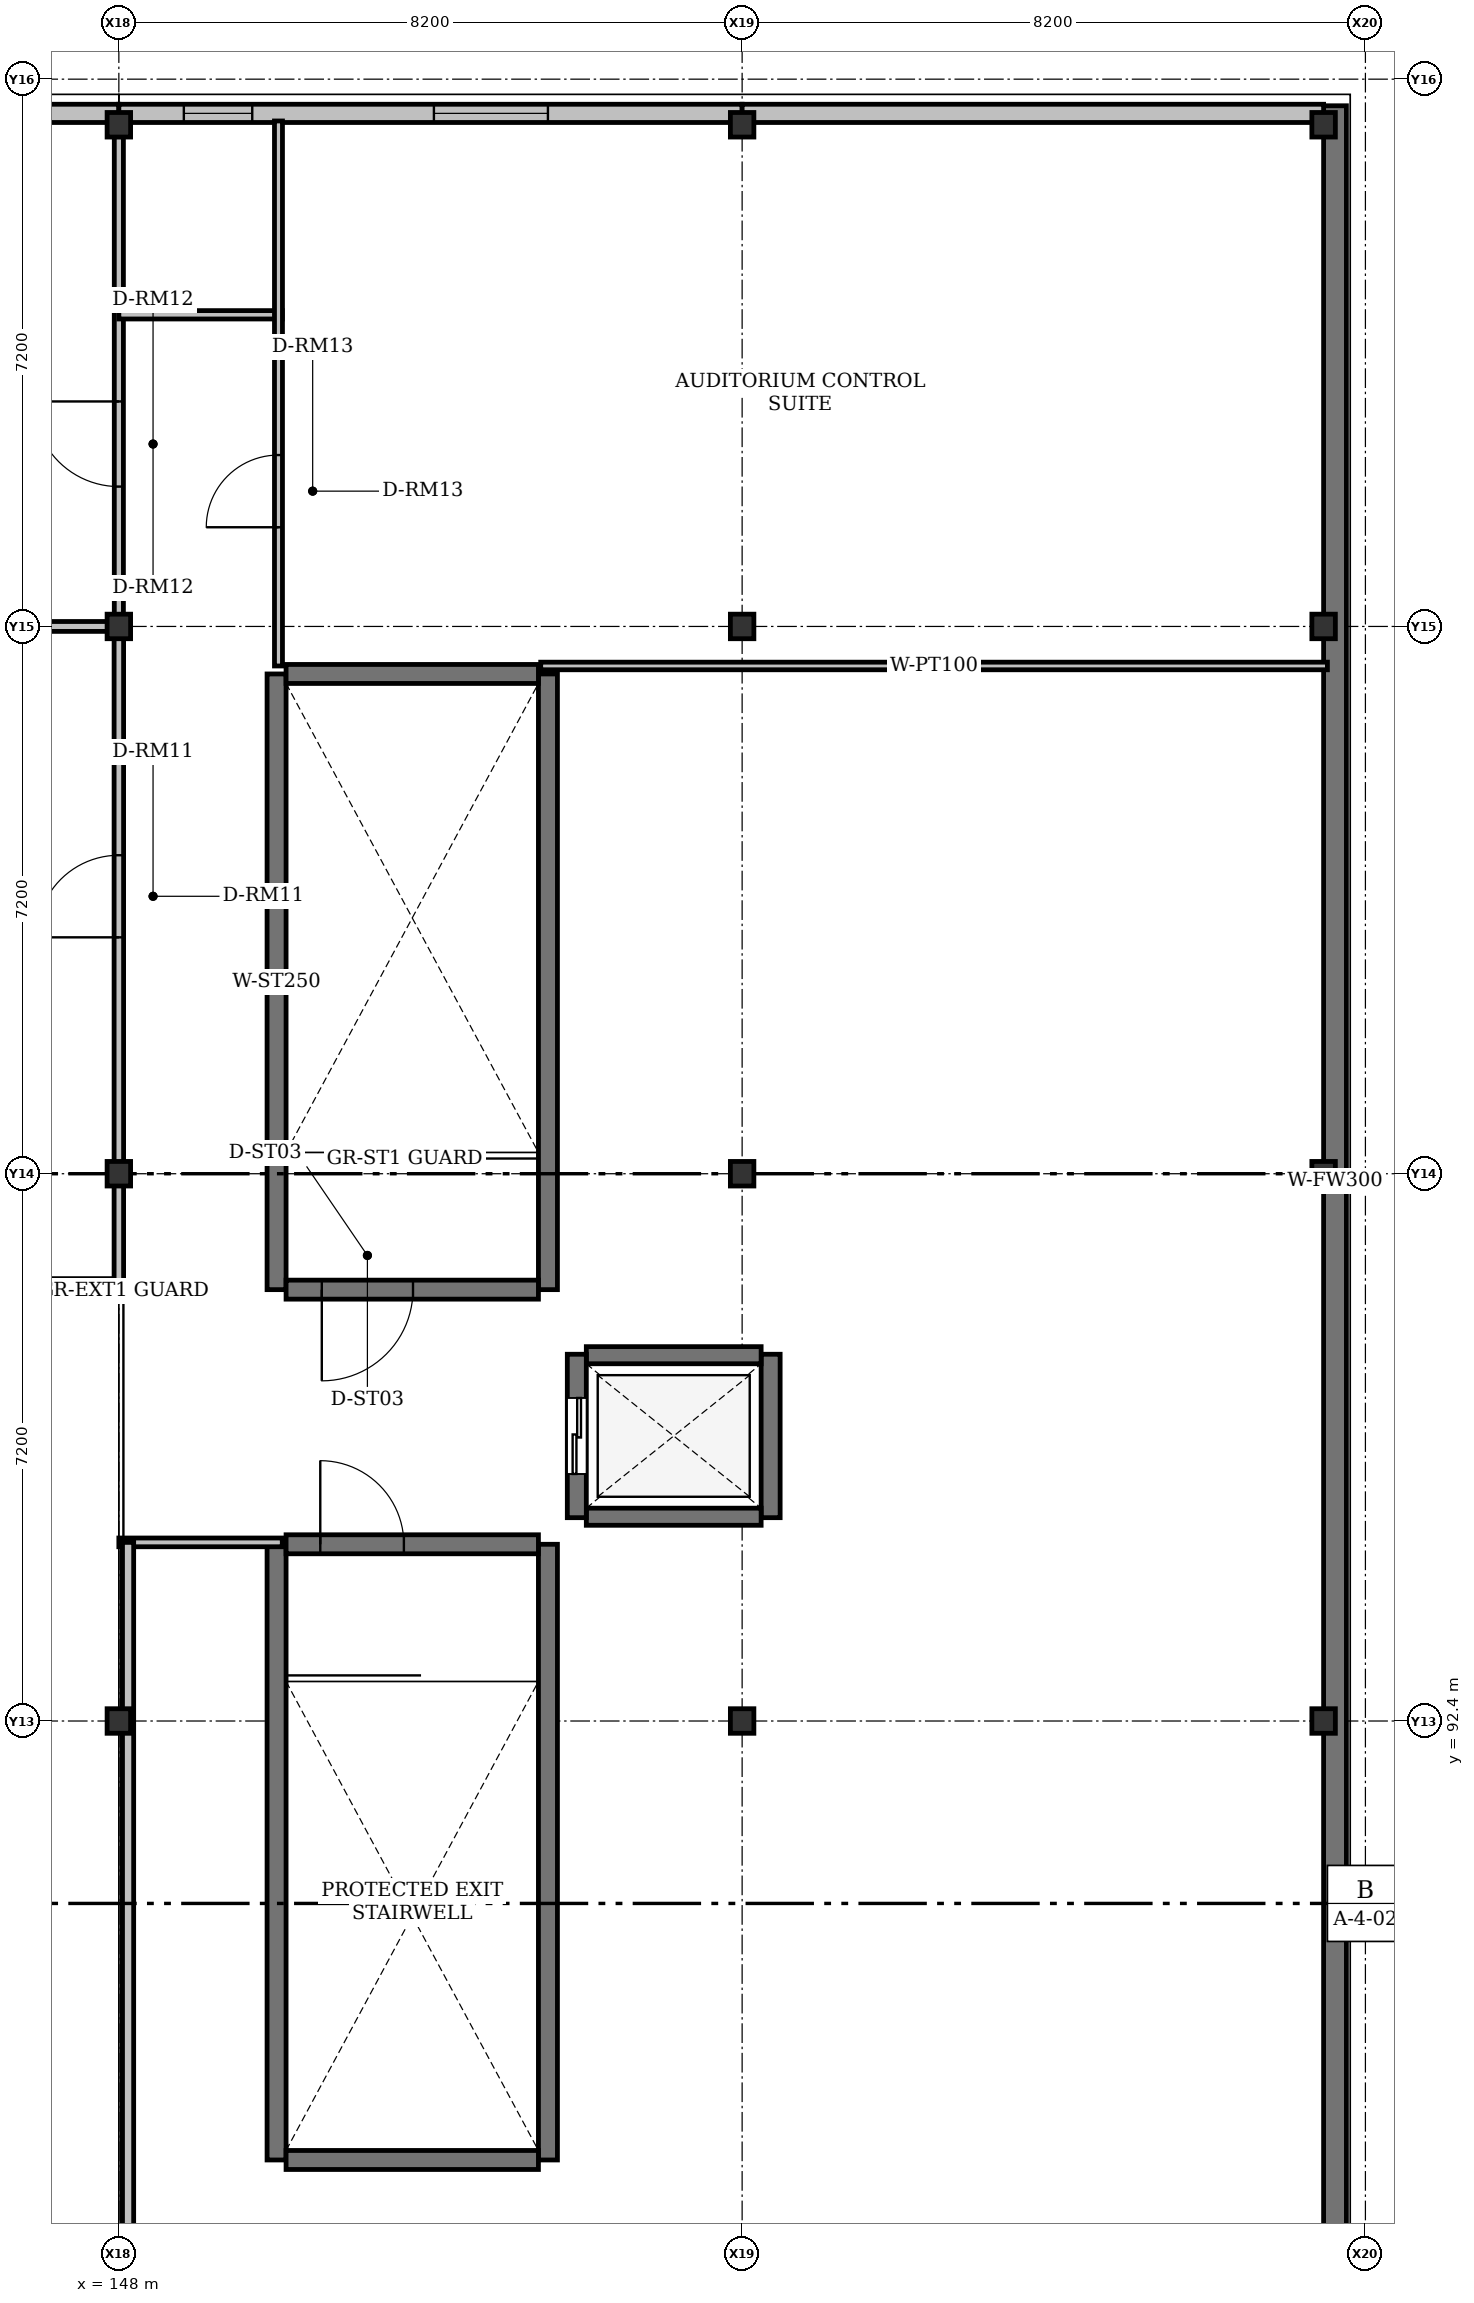
"""IFC4 building model, lengths in metres.
Left out: names, types, materials, properties, quantities, classifications, styles, units other than length and angle.
Written with IfcOpenShell. Run it as: python <this file> out.ifc"""

import sys

from ifc_helpers import new_model, si_unit, direction, frame, frame_2d, origin, origin_2d, place, context, subcontext, project, spatial, rectangle, i_section, extrude, element, fill, save


model = new_model("IFC4")
c1 = context("Model", 3, precision=1e-05, world=origin(), true_north=direction((0.0, 1.0)))
c2 = subcontext(c1, "Body", "Model", "MODEL_VIEW")
j1 = project(units=[si_unit("LENGTHUNIT", "METRE"), si_unit("PLANEANGLEUNIT", "RADIAN")], contexts=[c1])
p1 = place(None, origin())
s1 = spatial("IfcSite", under=j1, at=p1, CompositionType="ELEMENT")
p2 = place(p1, origin())
s2 = spatial("IfcBuilding", under=s1, at=p2, CompositionType="ELEMENT")
p3 = place(p2, frame((0.0, 0.0, 9.9)))
s3 = spatial("IfcBuildingStorey", under=s2, at=p3, CompositionType="ELEMENT", Elevation=9.9)
for number, where, z_axis, x_axis in (
    (1, (148.0, 92.4, 0.0), (0.0, 0.0, 1.0), (1.0, 0.0, 0.0)),
    (2, (148.0, 99.6, 0.0), (0.0, 0.0, 1.0), (1.0, 0.0, 0.0)),
    (3, (148.0, 106.8, 0.0), (0.0, 0.0, 1.0), (1.0, 0.0, 0.0)),
    (4, (148.0, 113.4, 0.0), (0.0, 0.0, 1.0), (1.0, 0.0, 0.0)),
    (5, (156.2, 92.4, 0.0), (0.0, 0.0, 1.0), (1.0, 0.0, 0.0)),
    (6, (156.2, 99.6, 0.0), (0.0, 0.0, 1.0), (1.0, 0.0, 0.0)),
    (7, (156.2, 106.8, 0.0), (0.0, 0.0, 1.0), (1.0, 0.0, 0.0)),
    (8, (156.2, 113.4, 0.0), (0.0, 0.0, 1.0), (1.0, 0.0, 0.0)),
    (9, (163.85, 92.4, 0.0), (0.0, 0.0, 1.0), (1.0, 0.0, 0.0)),
    (10, (163.85, 99.6, 0.0), (0.0, 0.0, 1.0), (1.0, 0.0, 0.0)),
    (11, (163.85, 106.8, 0.0), (0.0, 0.0, 1.0), (1.0, 0.0, 0.0)),
    (12, (163.85, 113.4, 0.0), (0.0, 0.0, 1.0), (1.0, 0.0, 0.0)),
):
    element("IfcColumn", number, at=place(p3, frame(where, z_axis=z_axis, x_axis=x_axis)), inside=s3, PredefinedType="COLUMN", context=c2, shape_type="SweptSolid", body=[
        extrude(i_section(OverallWidth=0.309, OverallDepth=0.323, WebThickness=0.014, FlangeThickness=0.023, FilletRadius=0.015, at=origin_2d()), origin(), (0.0, 0.0, 1.0), 2.9),
    ])
p4 = place(p3, frame((164.0, 113.65, 0.0), z_axis=(0.0, 0.0, 1.0), x_axis=(0.0, -1.0, 0.0)))
e13 = element("IfcWall", 13, at=p4, inside=s3, PredefinedType="SOLIDWALL", context=c2, shape_type="SweptSolid", body=[
    extrude(rectangle(XDim=28.3, YDim=0.3, at=frame_2d((14.15, 0.0))), origin(), (0.0, 0.0, 1.0), 2.7),
])
p5 = place(p3, frame((139.8, 113.55, 0.0), z_axis=(0.0, 0.0, 1.0), x_axis=(1.0, 0.0, 0.0)))
e14 = element("IfcWall", 14, at=p5, inside=s3, PredefinedType="SOLIDWALL", context=c2, shape_type="SweptSolid", body=[
    extrude(rectangle(XDim=8.2, YDim=0.24, at=frame_2d((4.1, 0.0))), origin(), (0.0, 0.0, 1.0), 2.6),
])
p6 = place(p3, frame((148.0, 113.55, 0.0), z_axis=(0.0, 0.0, 1.0), x_axis=(1.0, 0.0, 0.0)))
e15 = element("IfcWall", 15, at=p6, inside=s3, PredefinedType="SOLIDWALL", context=c2, shape_type="SweptSolid", body=[
    extrude(rectangle(XDim=8.2, YDim=0.24, at=frame_2d((4.1, 0.0))), origin(), (0.0, 0.0, 1.0), 2.6),
])
p7 = place(p6, frame((0.855, 0.0, 0.92)))
e16 = element("IfcOpeningElement", 16, at=p7, cuts=e15, PredefinedType="OPENING", context=c2, shape_type="SweptSolid", body=[
    extrude(rectangle(XDim=0.9, YDim=1.3, at=frame_2d((0.45, 0.65))), frame((0.0, 0.12, 0.0), z_axis=(0.0, -1.0, 0.0), x_axis=(1.0, 0.0, 0.0)), (0.0, 0.0, 1.0), 0.24),
])
p8 = place(p6, frame((4.145, 0.0, 0.92)))
e17 = element("IfcOpeningElement", 17, at=p8, cuts=e15, PredefinedType="OPENING", context=c2, shape_type="SweptSolid", body=[
    extrude(rectangle(XDim=1.5, YDim=1.4, at=frame_2d((0.75, 0.7))), frame((0.0, 0.12, 0.0), z_axis=(0.0, -1.0, 0.0), x_axis=(1.0, 0.0, 0.0)), (0.0, 0.0, 1.0), 0.24),
])
p9 = place(p3, frame((156.2, 113.55, 0.0), z_axis=(0.0, 0.0, 1.0), x_axis=(1.0, 0.0, 0.0)))
e18 = element("IfcWall", 18, at=p9, inside=s3, PredefinedType="SOLIDWALL", context=c2, shape_type="SweptSolid", body=[
    extrude(rectangle(XDim=7.65, YDim=0.24, at=frame_2d((3.825, 0.0))), origin(), (0.0, 0.0, 1.0), 2.6),
])
for number, where, z_axis, x_axis in (
    (19, (150.075, 86.625, 0.0), (0.0, 0.0, 1.0), (0.0, 1.0, 0.0)),
    (20, (153.645, 86.625, 0.0), (0.0, 0.0, 1.0), (0.0, 1.0, 0.0)),
):
    element("IfcWall", number, at=place(p3, frame(where, z_axis=z_axis, x_axis=x_axis)), inside=s3, PredefinedType="SHEAR", context=c2, shape_type="SweptSolid", body=[
        extrude(rectangle(XDim=8.1, YDim=0.25, at=frame_2d((4.05, 0.0))), origin(), (0.0, 0.0, 1.0), 2.85),
    ])
p10 = place(p3, frame((150.2, 86.625, 0.0), z_axis=(0.0, 0.0, 1.0), x_axis=(1.0, 0.0, 0.0)))
e21 = element("IfcWall", 21, at=p10, inside=s3, PredefinedType="SHEAR", context=c2, shape_type="SweptSolid", body=[
    extrude(rectangle(XDim=3.32, YDim=0.25, at=frame_2d((1.66, 0.0))), origin(), (0.0, 0.0, 1.0), 2.85),
])
p11 = place(p3, frame((150.2, 94.725, 0.0), z_axis=(0.0, 0.0, 1.0), x_axis=(1.0, 0.0, 0.0)))
e22 = element("IfcWall", 22, at=p11, inside=s3, PredefinedType="SHEAR", context=c2, shape_type="SweptSolid", body=[
    extrude(rectangle(XDim=3.32, YDim=0.25, at=frame_2d((1.66, 0.0))), origin(), (0.0, 0.0, 1.0), 2.85),
])
p12 = place(p11, frame((0.45, 0.0, 0.0)))
e23 = element("IfcOpeningElement", 23, at=p12, cuts=e22, PredefinedType="OPENING", context=c2, shape_type="SweptSolid", body=[
    extrude(rectangle(XDim=1.1, YDim=2.15, at=frame_2d((0.55, 1.075))), frame((0.0, 0.125, 0.0), z_axis=(0.0, -1.0, 0.0), x_axis=(1.0, 0.0, 0.0)), (0.0, 0.0, 1.0), 0.25),
])
for number, where, z_axis, x_axis in (
    (24, (150.075, 98.075, 0.0), (0.0, 0.0, 1.0), (0.0, 1.0, 0.0)),
    (25, (153.645, 98.075, 0.0), (0.0, 0.0, 1.0), (0.0, 1.0, 0.0)),
):
    element("IfcWall", number, at=place(p3, frame(where, z_axis=z_axis, x_axis=x_axis)), inside=s3, PredefinedType="SHEAR", context=c2, shape_type="SweptSolid", body=[
        extrude(rectangle(XDim=8.1, YDim=0.25, at=frame_2d((4.05, 0.0))), origin(), (0.0, 0.0, 1.0), 2.85),
    ])
p13 = place(p3, frame((150.2, 106.175, 0.0), z_axis=(0.0, 0.0, 1.0), x_axis=(1.0, 0.0, 0.0)))
e26 = element("IfcWall", 26, at=p13, inside=s3, PredefinedType="SHEAR", context=c2, shape_type="SweptSolid", body=[
    extrude(rectangle(XDim=3.32, YDim=0.25, at=frame_2d((1.66, 0.0))), origin(), (0.0, 0.0, 1.0), 2.85),
])
p14 = place(p3, frame((153.52, 98.075, 0.0), z_axis=(0.0, 0.0, 1.0), x_axis=(-1.0, 0.0, 0.0)))
e27 = element("IfcWall", 27, at=p14, inside=s3, PredefinedType="SHEAR", context=c2, shape_type="SweptSolid", body=[
    extrude(rectangle(XDim=3.32, YDim=0.25, at=frame_2d((1.66, 0.0))), origin(), (0.0, 0.0, 1.0), 2.85),
])
p15 = place(p14, frame((1.65, 0.0, 0.0)))
e28 = element("IfcOpeningElement", 28, at=p15, cuts=e27, PredefinedType="OPENING", context=c2, shape_type="SweptSolid", body=[
    extrude(rectangle(XDim=1.2, YDim=2.2, at=frame_2d((0.6, 1.1))), frame((0.0, 0.125, 0.0), z_axis=(0.0, -1.0, 0.0), x_axis=(1.0, 0.0, 0.0)), (0.0, 0.0, 1.0), 0.25),
])
p16 = place(p3, frame((156.575, 95.075, 0.0), z_axis=(0.0, 0.0, 1.0), x_axis=(0.0, 1.0, 0.0)))
e29 = element("IfcWall", 29, at=p16, inside=s3, PredefinedType="SHEAR", context=c2, shape_type="SweptSolid", body=[
    extrude(rectangle(XDim=2.15, YDim=0.25, at=frame_2d((1.075, 0.0))), origin(), (0.0, 0.0, 1.0), 2.85),
])
for number, where, z_axis, x_axis in (
    (30, (154.15, 95.087, 0.0), (0.0, 0.0, 1.0), (1.0, 0.0, 0.0)),
    (31, (154.15, 97.212, 0.0), (0.0, 0.0, 1.0), (1.0, 0.0, 0.0)),
):
    element("IfcWall", number, at=place(p3, frame(where, z_axis=z_axis, x_axis=x_axis)), inside=s3, PredefinedType="SHEAR", context=c2, shape_type="SweptSolid", body=[
        extrude(rectangle(XDim=2.3, YDim=0.225, at=frame_2d((1.15, 0.0))), origin(), (0.0, 0.0, 1.0), 2.85),
    ])
p17 = place(p3, frame((154.025, 95.075, 0.0), z_axis=(0.0, 0.0, 1.0), x_axis=(0.0, 1.0, 0.0)))
e32 = element("IfcWall", 32, at=p17, inside=s3, PredefinedType="SHEAR", context=c2, shape_type="SweptSolid", body=[
    extrude(rectangle(XDim=2.15, YDim=0.25, at=frame_2d((1.075, 0.0))), origin(), (0.0, 0.0, 1.0), 2.85),
])
p18 = place(p17, frame((0.575, 0.0, 0.0)))
e33 = element("IfcOpeningElement", 33, at=p18, cuts=e32, PredefinedType="OPENING", context=c2, shape_type="SweptSolid", body=[
    extrude(rectangle(XDim=1.0, YDim=2.1, at=frame_2d((0.5, 1.05))), frame((0.0, 0.125, 0.0), z_axis=(0.0, -1.0, 0.0), x_axis=(1.0, 0.0, 0.0)), (0.0, 0.0, 1.0), 0.25),
])
p19 = place(p3, frame((123.75, 98.15, 0.0), z_axis=(0.0, 0.0, 1.0), x_axis=(1.0, 0.0, 0.0)))
e34 = element("IfcWall", 34, at=p19, inside=s3, PredefinedType="PARTITIONING", context=c2, shape_type="SweptSolid", body=[
    extrude(rectangle(XDim=24.25, YDim=0.14, at=frame_2d((12.125, 0.0))), origin(), (0.0, 0.0, 1.0), 3.95),
])
p20 = place(p3, frame((123.75, 106.8, 0.0), z_axis=(0.0, 0.0, 1.0), x_axis=(1.0, 0.0, 0.0)))
e35 = element("IfcWall", 35, at=p20, inside=s3, PredefinedType="PARTITIONING", context=c2, shape_type="SweptSolid", body=[
    extrude(rectangle(XDim=24.101, YDim=0.13, at=frame_2d((12.05, 0.0))), origin(), (0.0, 0.0, 1.0), 3.95),
])
p21 = place(p3, frame((148.0, 98.15, 0.0), z_axis=(0.0, 0.0, 1.0), x_axis=(0.0, 1.0, 0.0)))
e36 = element("IfcWall", 36, at=p21, inside=s3, PredefinedType="PARTITIONING", context=c2, shape_type="SweptSolid", body=[
    extrude(rectangle(XDim=8.494, YDim=0.125, at=frame_2d((4.247, 0.0))), origin(), (0.0, 0.0, 1.0), 3.95),
])
p22 = place(p21, frame((4.56, 0.0, 0.0)))
e37 = element("IfcOpeningElement", 37, at=p22, cuts=e36, PredefinedType="OPENING", context=c2, shape_type="SweptSolid", body=[
    extrude(rectangle(XDim=1.08, YDim=2.15, at=frame_2d((0.54, 1.075))), frame((0.0, 0.062, 0.0), z_axis=(0.0, -1.0, 0.0), x_axis=(1.0, 0.0, 0.0)), (0.0, 0.0, 1.0), 0.125),
])
p23 = place(p3, frame((148.0, 106.957, 0.0), z_axis=(0.0, 0.0, 1.0), x_axis=(0.0, 1.0, 0.0)))
e38 = element("IfcWall", 38, at=p23, inside=s3, PredefinedType="PARTITIONING", context=c2, shape_type="SweptSolid", body=[
    extrude(rectangle(XDim=6.287, YDim=0.12, at=frame_2d((3.144, 0.0))), origin(), (0.0, 0.0, 1.0), 3.95),
])
p24 = place(p23, frame((1.684, 0.0, 0.0)))
e39 = element("IfcOpeningElement", 39, at=p24, cuts=e38, PredefinedType="OPENING", context=c2, shape_type="SweptSolid", body=[
    extrude(rectangle(XDim=1.12, YDim=2.15, at=frame_2d((0.56, 1.075))), frame((0.0, 0.06, 0.0), z_axis=(0.0, -1.0, 0.0), x_axis=(1.0, 0.0, 0.0)), (0.0, 0.0, 1.0), 0.12),
])
p25 = place(p3, frame((148.0, 94.75, 0.0), z_axis=(0.0, 0.0, 1.0), x_axis=(1.0, 0.0, 0.0)))
e40 = element("IfcWall", 40, at=p25, inside=s3, PredefinedType="PARTITIONING", context=c2, shape_type="SweptSolid", body=[
    extrude(rectangle(XDim=2.15, YDim=0.115, at=frame_2d((1.075, 0.0))), origin(), (0.0, 0.0, 1.0), 3.95),
])
p26 = place(p3, frame((148.0, 110.9, 0.0), z_axis=(0.0, 0.0, 1.0), x_axis=(1.0, 0.0, 0.0)))
e41 = element("IfcWall", 41, at=p26, inside=s3, PredefinedType="PARTITIONING", context=c2, shape_type="SweptSolid", body=[
    extrude(rectangle(XDim=2.15, YDim=0.11, at=frame_2d((1.075, 0.0))), origin(), (0.0, 0.0, 1.0), 3.95),
])
p27 = place(p3, frame((150.1, 106.28, 0.0), z_axis=(0.0, 0.0, 1.0), x_axis=(0.0, 1.0, 0.0)))
e42 = element("IfcWall", 42, at=p27, inside=s3, PredefinedType="PARTITIONING", context=c2, shape_type="SweptSolid", body=[
    extrude(rectangle(XDim=7.17, YDim=0.105, at=frame_2d((3.585, 0.0))), origin(), (0.0, 0.0, 1.0), 3.95),
])
p28 = place(p27, frame((1.825, 0.0, 0.0)))
e43 = element("IfcOpeningElement", 43, at=p28, cuts=e42, PredefinedType="OPENING", context=c2, shape_type="SweptSolid", body=[
    extrude(rectangle(XDim=0.95, YDim=2.2, at=frame_2d((0.475, 1.1))), frame((0.0, 0.052, 0.0), z_axis=(0.0, -1.0, 0.0), x_axis=(1.0, 0.0, 0.0)), (0.0, 0.0, 1.0), 0.105),
])
p29 = place(p3, frame((153.55, 106.28, 0.0), z_axis=(0.0, 0.0, 1.0), x_axis=(1.0, 0.0, 0.0)))
e44 = element("IfcWall", 44, at=p29, inside=s3, PredefinedType="PARTITIONING", context=c2, shape_type="SweptSolid", body=[
    extrude(rectangle(XDim=10.35, YDim=0.1, at=frame_2d((5.175, 0.0))), origin(), (0.0, 0.0, 1.0), 3.95),
])
p30 = place(p3, frame((148.12, 85.707, 0.0), z_axis=(0.0, 0.0, 1.0), x_axis=(0.0, 1.0, 0.0)))
e45 = element("IfcWall", 45, at=p30, inside=s3, PredefinedType="PARTITIONING", context=c2, shape_type="SweptSolid", body=[
    extrude(rectangle(XDim=9.043, YDim=0.15, at=frame_2d((4.522, 0.0))), origin(), (0.0, 0.0, 1.0), 3.95),
])
p31 = place(p7, origin())
e46 = element("IfcWindow", 46, at=p31, inside=s3, PartitioningType="SINGLE_PANEL", PredefinedType="WINDOW", context=c2, shape_type="SweptSolid", body=[
    extrude(rectangle(XDim=0.9, YDim=1.3, at=frame_2d((0.45, 0.65))), frame((0.0, 0.03, 0.0), z_axis=(0.0, -1.0, 0.0), x_axis=(1.0, 0.0, 0.0)), (0.0, 0.0, 1.0), 0.06),
])
fill(e16, e46)
p32 = place(p8, origin())
e47 = element("IfcWindow", 47, at=p32, inside=s3, PartitioningType="SINGLE_PANEL", PredefinedType="WINDOW", context=c2, shape_type="SweptSolid", body=[
    extrude(rectangle(XDim=1.5, YDim=1.4, at=frame_2d((0.75, 0.7))), frame((0.0, 0.03, 0.0), z_axis=(0.0, -1.0, 0.0), x_axis=(1.0, 0.0, 0.0)), (0.0, 0.0, 1.0), 0.06),
])
fill(e17, e47)
p33 = place(p12, origin())
e48 = element("IfcDoor", 48, at=p33, inside=s3, OperationType="SINGLE_SWING_LEFT", PredefinedType="DOOR", context=c2, shape_type="SweptSolid", body=[
    extrude(rectangle(XDim=1.1, YDim=2.15, at=frame_2d((0.55, 1.075))), frame((0.0, 0.025, 0.0), z_axis=(0.0, -1.0, 0.0), x_axis=(1.0, 0.0, 0.0)), (0.0, 0.0, 1.0), 0.05),
])
fill(e23, e48)
p34 = place(p15, origin())
e49 = element("IfcDoor", 49, at=p34, inside=s3, OperationType="SINGLE_SWING_RIGHT", PredefinedType="DOOR", context=c2, shape_type="SweptSolid", body=[
    extrude(rectangle(XDim=1.2, YDim=2.2, at=frame_2d((0.6, 1.1))), frame((0.0, 0.025, 0.0), z_axis=(0.0, -1.0, 0.0), x_axis=(1.0, 0.0, 0.0)), (0.0, 0.0, 1.0), 0.05),
])
fill(e28, e49)
p35 = place(p18, origin())
e50 = element("IfcDoor", 50, at=p35, inside=s3, OperationType="SLIDING_TO_LEFT", PredefinedType="DOOR", context=c2, shape_type="SweptSolid", body=[
    extrude(rectangle(XDim=1.0, YDim=2.1, at=frame_2d((0.5, 1.05))), frame((0.0, 0.025, 0.0), z_axis=(0.0, -1.0, 0.0), x_axis=(1.0, 0.0, 0.0)), (0.0, 0.0, 1.0), 0.05),
])
fill(e33, e50)
p36 = place(p22, origin())
e51 = element("IfcDoor", 51, at=p36, inside=s3, OperationType="SINGLE_SWING_LEFT", PredefinedType="DOOR", context=c2, shape_type="SweptSolid", body=[
    extrude(rectangle(XDim=1.08, YDim=2.15, at=frame_2d((0.54, 1.075))), frame((0.0, 0.025, 0.0), z_axis=(0.0, -1.0, 0.0), x_axis=(1.0, 0.0, 0.0)), (0.0, 0.0, 1.0), 0.05),
])
fill(e37, e51)
p37 = place(p24, origin())
e52 = element("IfcDoor", 52, at=p37, inside=s3, OperationType="SINGLE_SWING_RIGHT", PredefinedType="DOOR", context=c2, shape_type="SweptSolid", body=[
    extrude(rectangle(XDim=1.12, YDim=2.15, at=frame_2d((0.56, 1.075))), frame((0.0, 0.025, 0.0), z_axis=(0.0, -1.0, 0.0), x_axis=(1.0, 0.0, 0.0)), (0.0, 0.0, 1.0), 0.05),
])
fill(e39, e52)
p38 = place(p28, origin())
e53 = element("IfcDoor", 53, at=p38, inside=s3, OperationType="SINGLE_SWING_LEFT", PredefinedType="DOOR", context=c2, shape_type="SweptSolid", body=[
    extrude(rectangle(XDim=0.95, YDim=2.2, at=frame_2d((0.475, 1.1))), frame((0.0, 0.025, 0.0), z_axis=(0.0, -1.0, 0.0), x_axis=(1.0, 0.0, 0.0)), (0.0, 0.0, 1.0), 0.05),
])
fill(e43, e53)
save(model, sys.argv[1])
